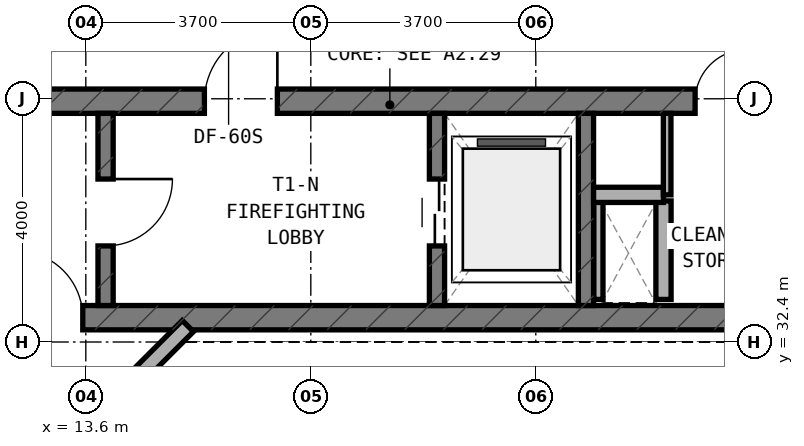
"""IFC4 building model, lengths in metres.
Left out: names, types, materials, properties, quantities, classifications, styles, units other than length and angle.
Written with IfcOpenShell. Run it as: python <this file> out.ifc"""

import sys

from ifc_helpers import new_model, si_unit, direction, frame, frame_2d, origin, place, context, subcontext, project, spatial, rectangle, extrude, element, fill, save


model = new_model("IFC4")
c1 = context("Model", 3, precision=1e-05, world=origin(), true_north=direction((0.0, 1.0)))
c2 = subcontext(c1, "Body", "Model", "MODEL_VIEW")
j1 = project(units=[si_unit("LENGTHUNIT", "METRE"), si_unit("PLANEANGLEUNIT", "RADIAN")], contexts=[c1])
p1 = place(None, origin())
s1 = spatial("IfcSite", under=j1, at=p1, CompositionType="ELEMENT")
p2 = place(p1, origin())
s2 = spatial("IfcBuilding", under=s1, at=p2, CompositionType="ELEMENT")
p3 = place(p2, frame((0.0, 0.0, 127.5)))
s3 = spatial("IfcBuildingStorey", under=s2, at=p3, CompositionType="ELEMENT", Elevation=127.5)
p4 = place(p3, frame((6.4, 32.8, 0.0), z_axis=(0.0, 0.0, 1.0), x_axis=(1.0, 0.0, 0.0)))
e1 = element("IfcWall", 1, at=p4, inside=s3, PredefinedType="SHEAR", context=c2, shape_type="SweptSolid", body=[
    extrude(rectangle(XDim=24.4, YDim=0.4, at=frame_2d((12.2, 0.0))), origin(), (0.0, 0.0, 1.0), 3.5),
])
p5 = place(p4, frame((6.05, 0.0, 0.0)))
e2 = element("IfcOpeningElement", 2, at=p5, cuts=e1, PredefinedType="OPENING", context=c2, shape_type="SweptSolid", body=[
    extrude(rectangle(XDim=1.1, YDim=2.15, at=frame_2d((0.55, 1.075))), frame((0.0, 0.21, 0.0), z_axis=(0.0, -1.0, 0.0), x_axis=(1.0, 0.0, 0.0)), (0.0, 0.0, 1.0), 0.42),
])
p6 = place(p3, frame((6.4, 36.36, 0.0), z_axis=(0.0, 0.0, 1.0), x_axis=(1.0, 0.0, 0.0)))
e3 = element("IfcWall", 3, at=p6, inside=s3, PredefinedType="SHEAR", context=c2, shape_type="SweptSolid", body=[
    extrude(rectangle(XDim=24.4, YDim=0.4, at=frame_2d((12.2, 0.0))), origin(), (0.0, 0.0, 1.0), 3.5),
])
p7 = place(p6, frame((9.15, 0.0, 0.0)))
e4 = element("IfcOpeningElement", 4, at=p7, cuts=e3, PredefinedType="OPENING", context=c2, shape_type="SweptSolid", body=[
    extrude(rectangle(XDim=1.2, YDim=2.15, at=frame_2d((0.6, 1.075))), frame((0.0, 0.21, 0.0), z_axis=(0.0, -1.0, 0.0), x_axis=(1.0, 0.0, 0.0)), (0.0, 0.0, 1.0), 0.42),
])
p8 = place(p6, frame((17.22, 0.0, 0.0)))
e5 = element("IfcOpeningElement", 5, at=p8, cuts=e3, PredefinedType="OPENING", context=c2, shape_type="SweptSolid", body=[
    extrude(rectangle(XDim=0.85, YDim=2.1, at=frame_2d((0.425, 1.05))), frame((0.0, 0.21, 0.0), z_axis=(0.0, -1.0, 0.0), x_axis=(1.0, 0.0, 0.0)), (0.0, 0.0, 1.0), 0.42),
])
p9 = place(p6, frame((18.783, 0.0, 0.0)))
e6 = element("IfcOpeningElement", 6, at=p9, cuts=e3, PredefinedType="OPENING", context=c2, shape_type="SweptSolid", body=[
    extrude(rectangle(XDim=1.1, YDim=2.15, at=frame_2d((0.55, 1.075))), frame((0.0, 0.21, 0.0), z_axis=(0.0, -1.0, 0.0), x_axis=(1.0, 0.0, 0.0)), (0.0, 0.0, 1.0), 0.42),
])
p10 = place(p6, frame((20.65, 0.0, 0.0)))
e7 = element("IfcOpeningElement", 7, at=p10, cuts=e3, PredefinedType="OPENING", context=c2, shape_type="SweptSolid", body=[
    extrude(rectangle(XDim=1.1, YDim=2.15, at=frame_2d((0.55, 1.075))), frame((0.0, 0.21, 0.0), z_axis=(0.0, -1.0, 0.0), x_axis=(1.0, 0.0, 0.0)), (0.0, 0.0, 1.0), 0.42),
])
p11 = place(p6, frame((22.517, 0.0, 0.0)))
e8 = element("IfcOpeningElement", 8, at=p11, cuts=e3, PredefinedType="OPENING", context=c2, shape_type="SweptSolid", body=[
    extrude(rectangle(XDim=1.1, YDim=2.15, at=frame_2d((0.55, 1.075))), frame((0.0, 0.21, 0.0), z_axis=(0.0, -1.0, 0.0), x_axis=(1.0, 0.0, 0.0)), (0.0, 0.0, 1.0), 0.42),
])
p12 = place(p3, frame((13.925, 33.0, 0.0), z_axis=(0.0, 0.0, 1.0), x_axis=(0.0, 1.0, 0.0)))
e9 = element("IfcWall", 9, at=p12, inside=s3, PredefinedType="STANDARD", context=c2, shape_type="SweptSolid", body=[
    extrude(rectangle(XDim=3.16, YDim=0.25, at=frame_2d((1.58, 0.0))), origin(), (0.0, 0.0, 1.0), 3.22),
])
p13 = place(p12, frame((0.98, 0.0, 0.0)))
e10 = element("IfcOpeningElement", 10, at=p13, cuts=e9, PredefinedType="OPENING", context=c2, shape_type="SweptSolid", body=[
    extrude(rectangle(XDim=1.1, YDim=2.15, at=frame_2d((0.55, 1.075))), frame((0.0, 0.135, 0.0), z_axis=(0.0, -1.0, 0.0), x_axis=(1.0, 0.0, 0.0)), (0.0, 0.0, 1.0), 0.27),
])
p14 = place(p3, frame((19.375, 33.0, 0.0), z_axis=(0.0, 0.0, 1.0), x_axis=(0.0, 1.0, 0.0)))
e11 = element("IfcWall", 11, at=p14, inside=s3, PredefinedType="STANDARD", context=c2, shape_type="SweptSolid", body=[
    extrude(rectangle(XDim=3.16, YDim=0.25, at=frame_2d((1.58, 0.0))), origin(), (0.0, 0.0, 1.0), 3.22),
])
p15 = place(p14, frame((0.98, 0.0, 0.0)))
e12 = element("IfcOpeningElement", 12, at=p15, cuts=e11, PredefinedType="OPENING", context=c2, shape_type="SweptSolid", body=[
    extrude(rectangle(XDim=1.1, YDim=2.15, at=frame_2d((0.55, 1.075))), frame((0.0, 0.135, 0.0), z_axis=(0.0, -1.0, 0.0), x_axis=(1.0, 0.0, 0.0)), (0.0, 0.0, 1.0), 0.27),
])
p16 = place(p3, frame((21.825, 33.0, 0.0), z_axis=(0.0, 0.0, 1.0), x_axis=(0.0, 1.0, 0.0)))
e13 = element("IfcWall", 13, at=p16, inside=s3, PredefinedType="STANDARD", context=c2, shape_type="SweptSolid", body=[
    extrude(rectangle(XDim=3.16, YDim=0.25, at=frame_2d((1.58, 0.0))), origin(), (0.0, 0.0, 1.0), 3.22),
])
p17 = place(p3, frame((15.278, 32.662, 0.0), z_axis=(0.0, 0.0, 1.0), x_axis=(-0.707059717605, -0.707153841636, 0.0)))
e14 = element("IfcWall", 14, at=p17, inside=s3, PredefinedType="STANDARD", context=c2, shape_type="SweptSolid", body=[
    extrude(rectangle(XDim=2.594, YDim=0.26, at=frame_2d((1.297, 0.0))), origin(), (0.0, 0.0, 1.0), 3.22),
])
p18 = place(p3, frame((22.03, 33.1, 0.0), z_axis=(0.0, 0.0, 1.0), x_axis=(0.0, 1.0, 0.0)))
e15 = element("IfcWall", 15, at=p18, inside=s3, PredefinedType="PARTITIONING", context=c2, shape_type="SweptSolid", body=[
    extrude(rectangle(XDim=1.62, YDim=0.15, at=frame_2d((0.81, 0.0))), origin(), (0.0, 0.0, 1.0), 3.22),
])
p19 = place(p3, frame((23.1, 33.1, 0.0), z_axis=(0.0, 0.0, 1.0), x_axis=(0.0, 1.0, 0.0)))
e16 = element("IfcWall", 16, at=p19, inside=s3, PredefinedType="SOLIDWALL", context=c2, shape_type="SweptSolid", body=[
    extrude(rectangle(XDim=1.62, YDim=0.25, at=frame_2d((0.81, 0.0))), origin(), (0.0, 0.0, 1.0), 3.22),
])
p20 = place(p3, frame((21.95, 34.82, 0.0), z_axis=(0.0, 0.0, 1.0), x_axis=(1.0, 0.0, 0.0)))
e17 = element("IfcWall", 17, at=p20, inside=s3, PredefinedType="SOLIDWALL", context=c2, shape_type="SweptSolid", body=[
    extrude(rectangle(XDim=1.15, YDim=0.25, at=frame_2d((0.575, 0.0))), origin(), (0.0, 0.0, 1.0), 3.22),
])
p21 = place(p3, frame((23.16, 34.82, 0.0), z_axis=(0.0, 0.0, 1.0), x_axis=(0.0, 1.0, 0.0)))
e18 = element("IfcWall", 18, at=p21, inside=s3, PredefinedType="PARTITIONING", context=c2, shape_type="SweptSolid", body=[
    extrude(rectangle(XDim=1.34, YDim=0.125, at=frame_2d((0.67, 0.0))), origin(), (0.0, 0.0, 1.0), 3.22),
])
p22 = place(p13, frame((1.1, 0.0, 0.0), z_axis=(0.0, 0.0, 1.0), x_axis=(-1.0, 0.0, 0.0)))
e19 = element("IfcDoor", 19, at=p22, inside=s3, OperationType="SINGLE_SWING_LEFT", PredefinedType="DOOR", context=c2, shape_type="SweptSolid", body=[
    extrude(rectangle(XDim=1.1, YDim=2.15, at=frame_2d((0.55, 1.075))), frame((0.0, 0.025, 0.0), z_axis=(0.0, -1.0, 0.0), x_axis=(1.0, 0.0, 0.0)), (0.0, 0.0, 1.0), 0.05),
])
fill(e10, e19)
p23 = place(p7, origin())
e20 = element("IfcDoor", 20, at=p23, inside=s3, OperationType="SINGLE_SWING_RIGHT", PredefinedType="DOOR", context=c2, shape_type="SweptSolid", body=[
    extrude(rectangle(XDim=1.2, YDim=2.15, at=frame_2d((0.6, 1.075))), frame((0.0, 0.025, 0.0), z_axis=(0.0, -1.0, 0.0), x_axis=(1.0, 0.0, 0.0)), (0.0, 0.0, 1.0), 0.05),
])
fill(e4, e20)
p24 = place(p15, origin())
e21 = element("IfcDoor", 21, at=p24, inside=s3, OperationType="DOUBLE_DOOR_SLIDING", PredefinedType="DOOR", context=c2, shape_type="SweptSolid", body=[
    extrude(rectangle(XDim=1.1, YDim=2.15, at=frame_2d((0.55, 1.075))), frame((0.0, 0.025, 0.0), z_axis=(0.0, -1.0, 0.0), x_axis=(1.0, 0.0, 0.0)), (0.0, 0.0, 1.0), 0.05),
])
fill(e12, e21)
p25 = place(p8, origin())
e22 = element("IfcDoor", 22, at=p25, inside=s3, OperationType="SINGLE_SWING_RIGHT", PredefinedType="DOOR", context=c2, shape_type="SweptSolid", body=[
    extrude(rectangle(XDim=0.85, YDim=2.1, at=frame_2d((0.425, 1.05))), frame((0.0, 0.025, 0.0), z_axis=(0.0, -1.0, 0.0), x_axis=(1.0, 0.0, 0.0)), (0.0, 0.0, 1.0), 0.05),
])
fill(e5, e22)
p26 = place(p5, origin())
e23 = element("IfcDoor", 23, at=p26, inside=s3, OperationType="SINGLE_SWING_LEFT", PredefinedType="DOOR", context=c2, shape_type="SweptSolid", body=[
    extrude(rectangle(XDim=1.1, YDim=2.15, at=frame_2d((0.55, 1.075))), frame((0.0, 0.025, 0.0), z_axis=(0.0, -1.0, 0.0), x_axis=(1.0, 0.0, 0.0)), (0.0, 0.0, 1.0), 0.05),
])
fill(e2, e23)
save(model, sys.argv[1])
